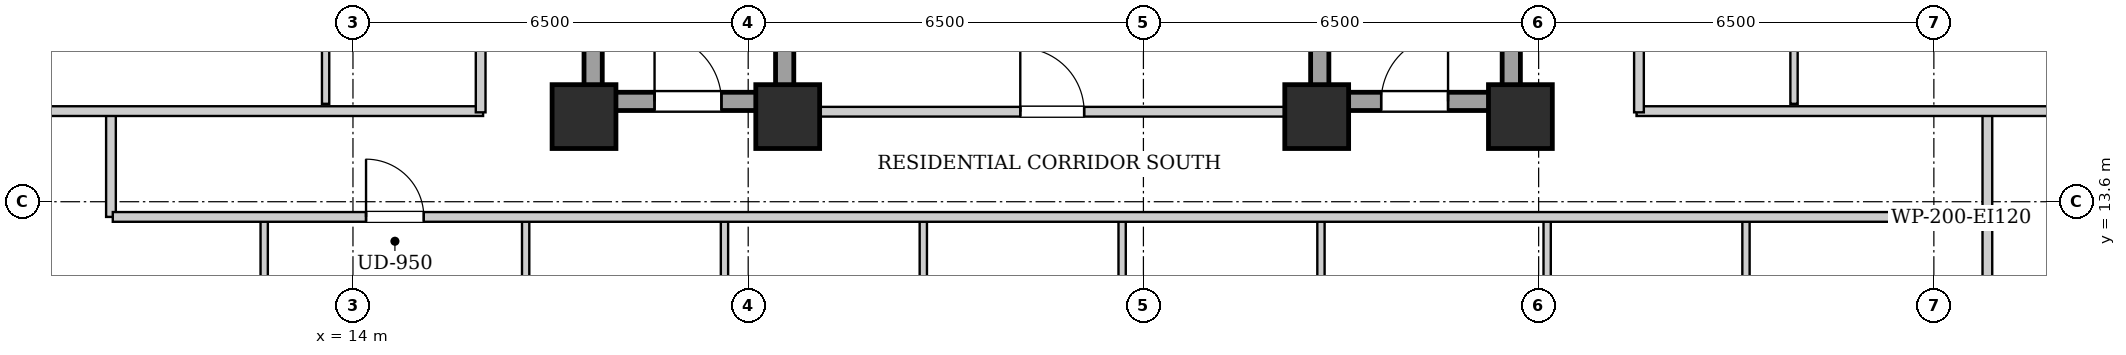
"""IFC4 building model, lengths in metres.
Left out: names, types, materials, properties, quantities, classifications, styles, units other than length and angle.
Written with IfcOpenShell. Run it as: python <this file> out.ifc"""

import sys

from ifc_helpers import new_model, si_unit, direction, frame, frame_2d, origin, origin_2d, place, context, subcontext, project, spatial, rectangle, extrude, element, fill, save


model = new_model("IFC4")
c1 = context("Model", 3, precision=1e-05, world=origin(), true_north=direction((0.0, 1.0)))
c2 = subcontext(c1, "Body", "Model", "MODEL_VIEW")
j1 = project(units=[si_unit("LENGTHUNIT", "METRE"), si_unit("PLANEANGLEUNIT", "RADIAN")], contexts=[c1])
p1 = place(None, origin())
s1 = spatial("IfcSite", under=j1, at=p1, CompositionType="ELEMENT")
p2 = place(p1, origin())
s2 = spatial("IfcBuilding", under=s1, at=p2, CompositionType="ELEMENT")
p3 = place(p2, frame((0.0, 0.0, 97.5)))
s3 = spatial("IfcBuildingStorey", under=s2, at=p3, CompositionType="ELEMENT", Elevation=97.5)
for number, where, z_axis, x_axis in (
    (1, (17.8, 15.0, 0.0), (0.0, 0.0, 1.0), (1.0, 0.0, 0.0)),
    (2, (21.15, 15.0, 0.0), (0.0, 0.0, 1.0), (1.0, 0.0, 0.0)),
    (3, (29.85, 15.0, 0.0), (0.0, 0.0, 1.0), (1.0, 0.0, 0.0)),
    (4, (33.2, 15.0, 0.0), (0.0, 0.0, 1.0), (1.0, 0.0, 0.0)),
):
    element("IfcColumn", number, at=place(p3, frame(where, z_axis=z_axis, x_axis=x_axis)), inside=s3, PredefinedType="COLUMN", context=c2, shape_type="SweptSolid", body=[
        extrude(rectangle(XDim=1.05, YDim=1.05, at=origin_2d()), origin(), (0.0, 0.0, 1.0), 3.2),
    ])
for number, where, z_axis, x_axis in (
    (5, (17.95, 15.1, 0.0), (0.0, 0.0, 1.0), (0.0, 1.0, 0.0)),
    (6, (21.1, 15.1, 0.0), (0.0, 0.0, 1.0), (0.0, 1.0, 0.0)),
):
    element("IfcWall", number, at=place(p3, frame(where, z_axis=z_axis, x_axis=x_axis)), inside=s3, PredefinedType="SHEAR", context=c2, shape_type="SweptSolid", body=[
        extrude(rectangle(XDim=9.0, YDim=0.3, at=frame_2d((4.5, 0.0))), origin(), (0.0, 0.0, 1.0), 2.94),
    ])
p4 = place(p3, frame((18.1, 15.25, 0.0), z_axis=(0.0, 0.0, 1.0), x_axis=(1.0, 0.0, 0.0)))
e7 = element("IfcWall", 7, at=p4, inside=s3, PredefinedType="SHEAR", context=c2, shape_type="SweptSolid", body=[
    extrude(rectangle(XDim=2.85, YDim=0.3, at=frame_2d((1.425, 0.0))), origin(), (0.0, 0.0, 1.0), 2.94),
])
p5 = place(p4, frame((0.86, 0.0, 0.0)))
e8 = element("IfcOpeningElement", 8, at=p5, cuts=e7, PredefinedType="OPENING", context=c2, shape_type="SweptSolid", body=[
    extrude(rectangle(XDim=1.1, YDim=2.05, at=frame_2d((0.55, 1.025))), frame((0.0, 0.16, 0.0), z_axis=(0.0, -1.0, 0.0), x_axis=(1.0, 0.0, 0.0)), (0.0, 0.0, 1.0), 0.32),
])
for number, where, z_axis, x_axis in (
    (9, (29.9, 15.1, 0.0), (0.0, 0.0, 1.0), (0.0, 1.0, 0.0)),
    (10, (33.05, 15.1, 0.0), (0.0, 0.0, 1.0), (0.0, 1.0, 0.0)),
):
    element("IfcWall", number, at=place(p3, frame(where, z_axis=z_axis, x_axis=x_axis)), inside=s3, PredefinedType="SHEAR", context=c2, shape_type="SweptSolid", body=[
        extrude(rectangle(XDim=9.0, YDim=0.3, at=frame_2d((4.5, 0.0))), origin(), (0.0, 0.0, 1.0), 2.94),
    ])
p6 = place(p3, frame((30.05, 15.25, 0.0), z_axis=(0.0, 0.0, 1.0), x_axis=(1.0, 0.0, 0.0)))
e11 = element("IfcWall", 11, at=p6, inside=s3, PredefinedType="SHEAR", context=c2, shape_type="SweptSolid", body=[
    extrude(rectangle(XDim=2.85, YDim=0.3, at=frame_2d((1.425, 0.0))), origin(), (0.0, 0.0, 1.0), 2.94),
])
p7 = place(p6, frame((0.86, 0.0, 0.0)))
e12 = element("IfcOpeningElement", 12, at=p7, cuts=e11, PredefinedType="OPENING", context=c2, shape_type="SweptSolid", body=[
    extrude(rectangle(XDim=1.1, YDim=2.05, at=frame_2d((0.55, 1.025))), frame((0.0, 0.16, 0.0), z_axis=(0.0, -1.0, 0.0), x_axis=(1.0, 0.0, 0.0)), (0.0, 0.0, 1.0), 0.32),
])
p8 = place(p3, frame((21.25, 15.08, 0.0), z_axis=(0.0, 0.0, 1.0), x_axis=(1.0, 0.0, 0.0)))
e13 = element("IfcWall", 13, at=p8, inside=s3, PredefinedType="PARTITIONING", context=c2, shape_type="SweptSolid", body=[
    extrude(rectangle(XDim=8.5, YDim=0.16, at=frame_2d((4.25, 0.0))), origin(), (0.0, 0.0, 1.0), 2.313),
])
p9 = place(p8, frame((3.725, 0.0, 0.0)))
e14 = element("IfcOpeningElement", 14, at=p9, cuts=e13, PredefinedType="OPENING", context=c2, shape_type="SweptSolid", body=[
    extrude(rectangle(XDim=1.05, YDim=2.05, at=frame_2d((0.525, 1.025))), frame((0.0, 0.09, 0.0), z_axis=(0.0, -1.0, 0.0), x_axis=(1.0, 0.0, 0.0)), (0.0, 0.0, 1.0), 0.18),
])
for number, where, z_axis, x_axis in (
    (15, (10.02, 13.35, 0.0), (0.0, 0.0, 1.0), (0.0, 1.0, 0.0)),
    (16, (40.88, 13.35, 0.0), (0.0, 0.0, 1.0), (0.0, 1.0, 0.0)),
):
    element("IfcWall", number, at=place(p3, frame(where, z_axis=z_axis, x_axis=x_axis)), inside=s3, PredefinedType="PARTITIONING", context=c2, shape_type="SweptSolid", body=[
        extrude(rectangle(XDim=1.74, YDim=0.16, at=frame_2d((0.87, 0.0))), origin(), (0.0, 0.0, 1.0), 2.94),
    ])
p10 = place(p3, frame((7.78, 15.09, 0.0), z_axis=(0.0, 0.0, 1.0), x_axis=(1.0, 0.0, 0.0)))
e17 = element("IfcWall", 17, at=p10, inside=s3, PredefinedType="PARTITIONING", context=c2, shape_type="SweptSolid", body=[
    extrude(rectangle(XDim=8.36, YDim=0.16, at=frame_2d((4.18, 0.0))), origin(), (0.0, 0.0, 1.0), 2.313),
])
p11 = place(p3, frame((35.11, 15.09, 0.0), z_axis=(0.0, 0.0, 1.0), x_axis=(1.0, 0.0, 0.0)))
e18 = element("IfcWall", 18, at=p11, inside=s3, PredefinedType="PARTITIONING", context=c2, shape_type="SweptSolid", body=[
    extrude(rectangle(XDim=8.01, YDim=0.16, at=frame_2d((4.005, 0.0))), origin(), (0.0, 0.0, 1.0), 2.313),
])
p12 = place(p3, frame((40.88, 10.4, 0.0), z_axis=(0.0, 0.0, 1.0), x_axis=(0.0, 1.0, 0.0)))
e19 = element("IfcWall", 19, at=p12, inside=s3, PredefinedType="PARTITIONING", context=c2, shape_type="SweptSolid", body=[
    extrude(rectangle(XDim=2.91, YDim=0.16, at=frame_2d((1.455, 0.0))), origin(), (0.0, 0.0, 1.0), 2.94),
])
p13 = place(p3, frame((12.54, 10.46, 0.0), z_axis=(0.0, 0.0, 1.0), x_axis=(0.0, 1.0, 0.0)))
e20 = element("IfcWall", 20, at=p13, inside=s3, PredefinedType="PARTITIONING", context=c2, shape_type="SweptSolid", body=[
    extrude(rectangle(XDim=2.85, YDim=0.12, at=frame_2d((1.425, 0.0))), origin(), (0.0, 0.0, 1.0), 2.94),
])
p14 = place(p13, frame((0.995, 0.0, 0.0)))
e21 = element("IfcOpeningElement", 21, at=p14, cuts=e20, PredefinedType="OPENING", context=c2, shape_type="SweptSolid", body=[
    extrude(rectangle(XDim=0.86, YDim=2.05, at=frame_2d((0.43, 1.025))), frame((0.0, 0.07, 0.0), z_axis=(0.0, -1.0, 0.0), x_axis=(1.0, 0.0, 0.0)), (0.0, 0.0, 1.0), 0.14),
])
p15 = place(p3, frame((16.84, 10.46, 0.0), z_axis=(0.0, 0.0, 1.0), x_axis=(0.0, 1.0, 0.0)))
e22 = element("IfcWall", 22, at=p15, inside=s3, PredefinedType="PARTITIONING", context=c2, shape_type="SweptSolid", body=[
    extrude(rectangle(XDim=2.85, YDim=0.12, at=frame_2d((1.425, 0.0))), origin(), (0.0, 0.0, 1.0), 2.94),
])
p16 = place(p15, frame((0.975, 0.0, 0.0)))
e23 = element("IfcOpeningElement", 23, at=p16, cuts=e22, PredefinedType="OPENING", context=c2, shape_type="SweptSolid", body=[
    extrude(rectangle(XDim=0.9, YDim=2.05, at=frame_2d((0.45, 1.025))), frame((0.0, 0.07, 0.0), z_axis=(0.0, -1.0, 0.0), x_axis=(1.0, 0.0, 0.0)), (0.0, 0.0, 1.0), 0.14),
])
p17 = place(p3, frame((20.11, 10.46, 0.0), z_axis=(0.0, 0.0, 1.0), x_axis=(0.0, 1.0, 0.0)))
e24 = element("IfcWall", 24, at=p17, inside=s3, PredefinedType="PARTITIONING", context=c2, shape_type="SweptSolid", body=[
    extrude(rectangle(XDim=2.85, YDim=0.12, at=frame_2d((1.425, 0.0))), origin(), (0.0, 0.0, 1.0), 2.94),
])
p18 = place(p17, frame((0.975, 0.0, 0.0)))
e25 = element("IfcOpeningElement", 25, at=p18, cuts=e24, PredefinedType="OPENING", context=c2, shape_type="SweptSolid", body=[
    extrude(rectangle(XDim=0.9, YDim=2.05, at=frame_2d((0.45, 1.025))), frame((0.0, 0.07, 0.0), z_axis=(0.0, -1.0, 0.0), x_axis=(1.0, 0.0, 0.0)), (0.0, 0.0, 1.0), 0.14),
])
p19 = place(p3, frame((23.38, 10.46, 0.0), z_axis=(0.0, 0.0, 1.0), x_axis=(0.0, 1.0, 0.0)))
e26 = element("IfcWall", 26, at=p19, inside=s3, PredefinedType="PARTITIONING", context=c2, shape_type="SweptSolid", body=[
    extrude(rectangle(XDim=2.85, YDim=0.12, at=frame_2d((1.425, 0.0))), origin(), (0.0, 0.0, 1.0), 2.94),
])
p20 = place(p19, frame((0.975, 0.0, 0.0)))
e27 = element("IfcOpeningElement", 27, at=p20, cuts=e26, PredefinedType="OPENING", context=c2, shape_type="SweptSolid", body=[
    extrude(rectangle(XDim=0.9, YDim=2.05, at=frame_2d((0.45, 1.025))), frame((0.0, 0.07, 0.0), z_axis=(0.0, -1.0, 0.0), x_axis=(1.0, 0.0, 0.0)), (0.0, 0.0, 1.0), 0.14),
])
p21 = place(p3, frame((26.65, 10.46, 0.0), z_axis=(0.0, 0.0, 1.0), x_axis=(0.0, 1.0, 0.0)))
e28 = element("IfcWall", 28, at=p21, inside=s3, PredefinedType="PARTITIONING", context=c2, shape_type="SweptSolid", body=[
    extrude(rectangle(XDim=2.85, YDim=0.12, at=frame_2d((1.425, 0.0))), origin(), (0.0, 0.0, 1.0), 2.94),
])
p22 = place(p21, frame((0.975, 0.0, 0.0)))
e29 = element("IfcOpeningElement", 29, at=p22, cuts=e28, PredefinedType="OPENING", context=c2, shape_type="SweptSolid", body=[
    extrude(rectangle(XDim=0.9, YDim=2.05, at=frame_2d((0.45, 1.025))), frame((0.0, 0.07, 0.0), z_axis=(0.0, -1.0, 0.0), x_axis=(1.0, 0.0, 0.0)), (0.0, 0.0, 1.0), 0.14),
])
p23 = place(p3, frame((29.92, 10.46, 0.0), z_axis=(0.0, 0.0, 1.0), x_axis=(0.0, 1.0, 0.0)))
e30 = element("IfcWall", 30, at=p23, inside=s3, PredefinedType="PARTITIONING", context=c2, shape_type="SweptSolid", body=[
    extrude(rectangle(XDim=2.85, YDim=0.12, at=frame_2d((1.425, 0.0))), origin(), (0.0, 0.0, 1.0), 2.94),
])
p24 = place(p23, frame((0.975, 0.0, 0.0)))
e31 = element("IfcOpeningElement", 31, at=p24, cuts=e30, PredefinedType="OPENING", context=c2, shape_type="SweptSolid", body=[
    extrude(rectangle(XDim=0.9, YDim=2.05, at=frame_2d((0.45, 1.025))), frame((0.0, 0.07, 0.0), z_axis=(0.0, -1.0, 0.0), x_axis=(1.0, 0.0, 0.0)), (0.0, 0.0, 1.0), 0.14),
])
p25 = place(p3, frame((33.64, 10.46, 0.0), z_axis=(0.0, 0.0, 1.0), x_axis=(0.0, 1.0, 0.0)))
e32 = element("IfcWall", 32, at=p25, inside=s3, PredefinedType="PARTITIONING", context=c2, shape_type="SweptSolid", body=[
    extrude(rectangle(XDim=2.85, YDim=0.12, at=frame_2d((1.425, 0.0))), origin(), (0.0, 0.0, 1.0), 2.94),
])
p26 = place(p25, frame((0.975, 0.0, 0.0)))
e33 = element("IfcOpeningElement", 33, at=p26, cuts=e32, PredefinedType="OPENING", context=c2, shape_type="SweptSolid", body=[
    extrude(rectangle(XDim=0.9, YDim=2.05, at=frame_2d((0.45, 1.025))), frame((0.0, 0.07, 0.0), z_axis=(0.0, -1.0, 0.0), x_axis=(1.0, 0.0, 0.0)), (0.0, 0.0, 1.0), 0.14),
])
p27 = place(p3, frame((36.91, 10.46, 0.0), z_axis=(0.0, 0.0, 1.0), x_axis=(0.0, 1.0, 0.0)))
e34 = element("IfcWall", 34, at=p27, inside=s3, PredefinedType="PARTITIONING", context=c2, shape_type="SweptSolid", body=[
    extrude(rectangle(XDim=2.85, YDim=0.12, at=frame_2d((1.425, 0.0))), origin(), (0.0, 0.0, 1.0), 2.94),
])
p28 = place(p27, frame((0.975, 0.0, 0.0)))
e35 = element("IfcOpeningElement", 35, at=p28, cuts=e34, PredefinedType="OPENING", context=c2, shape_type="SweptSolid", body=[
    extrude(rectangle(XDim=0.9, YDim=2.05, at=frame_2d((0.45, 1.025))), frame((0.0, 0.07, 0.0), z_axis=(0.0, -1.0, 0.0), x_axis=(1.0, 0.0, 0.0)), (0.0, 0.0, 1.0), 0.14),
])
p29 = place(p3, frame((13.55, 15.21, 0.0), z_axis=(0.0, 0.0, 1.0), x_axis=(0.0, 1.0, 0.0)))
e36 = element("IfcWall", 36, at=p29, inside=s3, PredefinedType="PARTITIONING", context=c2, shape_type="SweptSolid", body=[
    extrude(rectangle(XDim=2.159, YDim=0.12, at=frame_2d((1.08, 0.0))), origin(), (0.0, 0.0, 1.0), 2.94),
])
p30 = place(p3, frame((37.7, 15.21, 0.0), z_axis=(0.0, 0.0, 1.0), x_axis=(0.0, 1.0, 0.0)))
e37 = element("IfcWall", 37, at=p30, inside=s3, PredefinedType="PARTITIONING", context=c2, shape_type="SweptSolid", body=[
    extrude(rectangle(XDim=2.3, YDim=0.12, at=frame_2d((1.15, 0.0))), origin(), (0.0, 0.0, 1.0), 2.94),
])
p31 = place(p3, frame((10.05, 13.35, 0.0), z_axis=(0.0, 0.0, 1.0), x_axis=(1.0, 0.0, 0.0)))
e38 = element("IfcWall", 38, at=p31, inside=s3, PredefinedType="PARTITIONING", context=c2, shape_type="SweptSolid", body=[
    extrude(rectangle(XDim=30.8, YDim=0.16, at=frame_2d((15.4, 0.0))), origin(), (0.0, 0.0, 1.0), 2.94),
])
p32 = place(p31, frame((4.165, 0.0, 0.0)))
e39 = element("IfcOpeningElement", 39, at=p32, cuts=e38, PredefinedType="OPENING", context=c2, shape_type="SweptSolid", body=[
    extrude(rectangle(XDim=0.95, YDim=2.1, at=frame_2d((0.475, 1.05))), frame((0.0, 0.09, 0.0), z_axis=(0.0, -1.0, 0.0), x_axis=(1.0, 0.0, 0.0)), (0.0, 0.0, 1.0), 0.18),
])
p33 = place(p3, frame((16.1, 15.07, 0.0), z_axis=(0.0, 0.0, 1.0), x_axis=(0.0, 1.0, 0.0)))
e40 = element("IfcWall", 40, at=p33, inside=s3, PredefinedType="PARTITIONING", context=c2, shape_type="SweptSolid", body=[
    extrude(rectangle(XDim=13.93, YDim=0.16, at=frame_2d((6.965, 0.0))), origin(), (0.0, 0.0, 1.0), 2.94),
])
p34 = place(p33, frame((4.661, 0.0, 0.0)))
e41 = element("IfcOpeningElement", 41, at=p34, cuts=e40, PredefinedType="OPENING", context=c2, shape_type="SweptSolid", body=[
    extrude(rectangle(XDim=0.95, YDim=2.1, at=frame_2d((0.475, 1.05))), frame((0.0, 0.09, 0.0), z_axis=(0.0, -1.0, 0.0), x_axis=(1.0, 0.0, 0.0)), (0.0, 0.0, 1.0), 0.18),
])
p35 = place(p33, frame((11.411, 0.0, 0.0)))
e42 = element("IfcOpeningElement", 42, at=p35, cuts=e40, PredefinedType="OPENING", context=c2, shape_type="SweptSolid", body=[
    extrude(rectangle(XDim=0.95, YDim=2.1, at=frame_2d((0.475, 1.05))), frame((0.0, 0.09, 0.0), z_axis=(0.0, -1.0, 0.0), x_axis=(1.0, 0.0, 0.0)), (0.0, 0.0, 1.0), 0.18),
])
p36 = place(p3, frame((35.15, 15.07, 0.0), z_axis=(0.0, 0.0, 1.0), x_axis=(0.0, 1.0, 0.0)))
e43 = element("IfcWall", 43, at=p36, inside=s3, PredefinedType="PARTITIONING", context=c2, shape_type="SweptSolid", body=[
    extrude(rectangle(XDim=13.93, YDim=0.16, at=frame_2d((6.965, 0.0))), origin(), (0.0, 0.0, 1.0), 2.94),
])
p37 = place(p36, frame((4.385, 0.0, 0.0)))
e44 = element("IfcOpeningElement", 44, at=p37, cuts=e43, PredefinedType="OPENING", context=c2, shape_type="SweptSolid", body=[
    extrude(rectangle(XDim=0.95, YDim=2.1, at=frame_2d((0.475, 1.05))), frame((0.0, 0.09, 0.0), z_axis=(0.0, -1.0, 0.0), x_axis=(1.0, 0.0, 0.0)), (0.0, 0.0, 1.0), 0.18),
])
p38 = place(p5, origin())
e45 = element("IfcDoor", 45, at=p38, inside=s3, OperationType="SINGLE_SWING_LEFT", PredefinedType="DOOR", context=c2, shape_type="SweptSolid", body=[
    extrude(rectangle(XDim=1.1, YDim=2.05, at=frame_2d((0.55, 1.025))), frame((0.0, 0.025, 0.0), z_axis=(0.0, -1.0, 0.0), x_axis=(1.0, 0.0, 0.0)), (0.0, 0.0, 1.0), 0.05),
])
fill(e8, e45)
p39 = place(p7, origin())
e46 = element("IfcDoor", 46, at=p39, inside=s3, OperationType="SINGLE_SWING_RIGHT", PredefinedType="DOOR", context=c2, shape_type="SweptSolid", body=[
    extrude(rectangle(XDim=1.1, YDim=2.05, at=frame_2d((0.55, 1.025))), frame((0.0, 0.025, 0.0), z_axis=(0.0, -1.0, 0.0), x_axis=(1.0, 0.0, 0.0)), (0.0, 0.0, 1.0), 0.05),
])
fill(e12, e46)
p40 = place(p9, origin())
e47 = element("IfcDoor", 47, at=p40, inside=s3, OperationType="SINGLE_SWING_LEFT", PredefinedType="DOOR", context=c2, shape_type="SweptSolid", body=[
    extrude(rectangle(XDim=1.05, YDim=2.05, at=frame_2d((0.525, 1.025))), frame((0.0, 0.025, 0.0), z_axis=(0.0, -1.0, 0.0), x_axis=(1.0, 0.0, 0.0)), (0.0, 0.0, 1.0), 0.05),
])
fill(e14, e47)
p41 = place(p32, origin())
e48 = element("IfcDoor", 48, at=p41, inside=s3, OperationType="SINGLE_SWING_LEFT", PredefinedType="DOOR", context=c2, shape_type="SweptSolid", body=[
    extrude(rectangle(XDim=0.95, YDim=2.1, at=frame_2d((0.475, 1.05))), frame((0.0, 0.025, 0.0), z_axis=(0.0, -1.0, 0.0), x_axis=(1.0, 0.0, 0.0)), (0.0, 0.0, 1.0), 0.05),
])
fill(e39, e48)
save(model, sys.argv[1])
